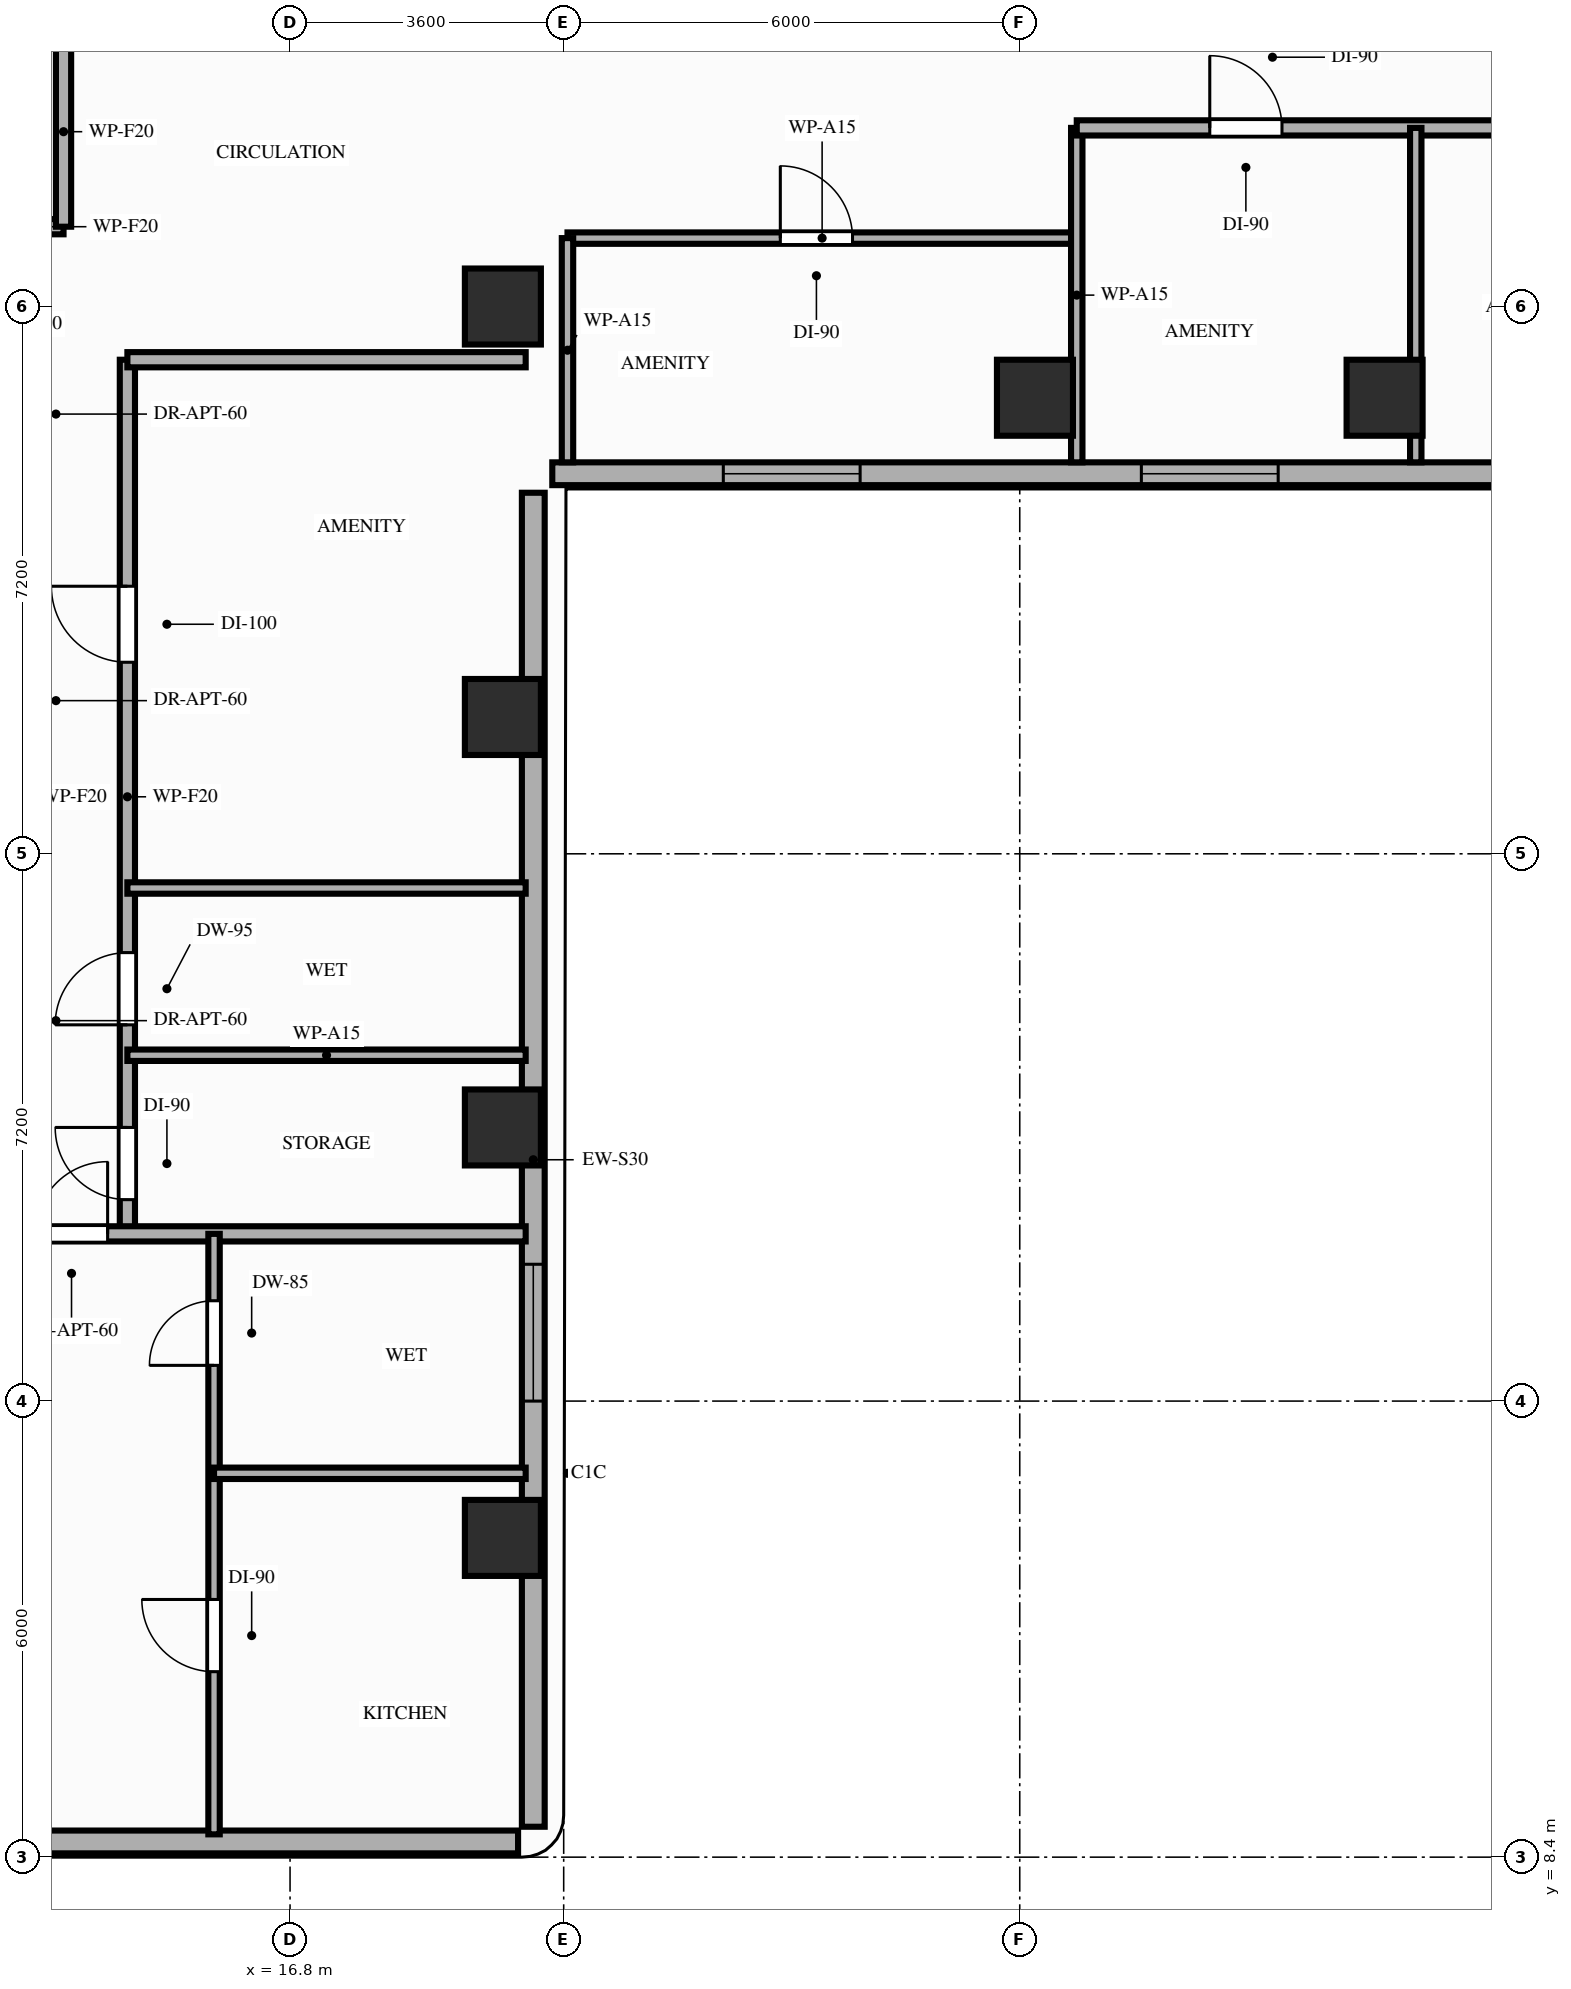
"""IFC4 building model, lengths in metres.
Left out: names, types, materials, properties, quantities, classifications, styles, units other than length and angle.
Written with IfcOpenShell. Run it as: python <this file> out.ifc"""

import sys

from ifc_helpers import new_model, si_unit, direction, frame, frame_2d, origin, origin_2d, place, context, subcontext, project, spatial, rectangle, extrude, element, fill, save


model = new_model("IFC4")
c1 = context("Model", 3, precision=1e-05, world=origin(), true_north=direction((0.0, 1.0)))
c2 = subcontext(c1, "Body", "Model", "MODEL_VIEW")
j1 = project(units=[si_unit("LENGTHUNIT", "METRE"), si_unit("PLANEANGLEUNIT", "RADIAN")], contexts=[c1])
p1 = place(None, origin())
s1 = spatial("IfcSite", under=j1, at=p1, CompositionType="ELEMENT")
p2 = place(p1, origin())
s2 = spatial("IfcBuilding", under=s1, at=p2, CompositionType="ELEMENT")
p3 = place(p2, frame((0.0, 0.0, 123.4)))
s3 = spatial("IfcBuildingStorey", under=s2, at=p3, CompositionType="ELEMENT", Elevation=123.4)
for number, where, z_axis, x_axis in (
    (1, (19.6, 12.6, 0.0), (0.0, 0.0, 1.0), (1.0, 0.0, 0.0)),
    (2, (19.6, 18.0, 0.0), (0.0, 0.0, 1.0), (1.0, 0.0, 0.0)),
    (3, (19.6, 23.4, 0.0), (0.0, 0.0, 1.0), (1.0, 0.0, 0.0)),
    (4, (19.6, 28.8, 0.0), (0.0, 0.0, 1.0), (1.0, 0.0, 0.0)),
    (5, (26.6, 27.6, 0.0), (0.0, 0.0, 1.0), (1.0, 0.0, 0.0)),
    (6, (31.2, 27.6, 0.0), (0.0, 0.0, 1.0), (1.0, 0.0, 0.0)),
):
    element("IfcColumn", number, at=place(p3, frame(where, z_axis=z_axis, x_axis=x_axis)), inside=s3, PredefinedType="COLUMN", context=c2, shape_type="SweptSolid", body=[
        extrude(rectangle(XDim=1.0, YDim=1.0, at=origin_2d()), origin(), (0.0, 0.0, 1.0), 3.2),
    ])
p4 = place(p3, frame((4.0, 8.6, 0.0), z_axis=(0.0, 0.0, 1.0), x_axis=(1.0, 0.0, 0.0)))
e7 = element("IfcWall", 7, at=p4, inside=s3, PredefinedType="STANDARD", context=c2, shape_type="SweptSolid", body=[
    extrude(rectangle(XDim=15.8, YDim=0.3, at=frame_2d((7.9, 0.0))), origin(), (0.0, 0.0, 1.0), 3.02),
])
p5 = place(p4, frame((6.85, 0.0, 0.85)))
e8 = element("IfcOpeningElement", 8, at=p5, cuts=e7, PredefinedType="OPENING", context=c2, shape_type="SweptSolid", body=[
    extrude(rectangle(XDim=1.8, YDim=1.75, at=frame_2d((0.9, 0.875))), frame((0.0, 0.16, 0.0), z_axis=(0.0, -1.0, 0.0), x_axis=(1.0, 0.0, 0.0)), (0.0, 0.0, 1.0), 0.32),
])
p6 = place(p3, frame((20.0, 8.8, 0.0), z_axis=(0.0, 0.0, 1.0), x_axis=(0.0, 1.0, 0.0)))
e9 = element("IfcWall", 9, at=p6, inside=s3, PredefinedType="STANDARD", context=c2, shape_type="SweptSolid", body=[
    extrude(rectangle(XDim=17.55, YDim=0.3, at=frame_2d((8.775, 0.0))), origin(), (0.0, 0.0, 1.0), 2.45),
])
p7 = place(p6, frame((5.6, 0.0, 0.85)))
e10 = element("IfcOpeningElement", 10, at=p7, cuts=e9, PredefinedType="OPENING", context=c2, shape_type="SweptSolid", body=[
    extrude(rectangle(XDim=1.8, YDim=1.35, at=frame_2d((0.9, 0.675))), frame((0.0, 0.16, 0.0), z_axis=(0.0, -1.0, 0.0), x_axis=(1.0, 0.0, 0.0)), (0.0, 0.0, 1.0), 0.32),
])
p8 = place(p3, frame((20.25, 26.6, 0.0), z_axis=(0.0, 0.0, 1.0), x_axis=(1.0, 0.0, 0.0)))
e11 = element("IfcWall", 11, at=p8, inside=s3, PredefinedType="STANDARD", context=c2, shape_type="SweptSolid", body=[
    extrude(rectangle(XDim=26.15, YDim=0.3, at=frame_2d((13.075, 0.0))), origin(), (0.0, 0.0, 1.0), 2.71),
])
p9 = place(p8, frame((13.9, 0.0, 0.0)))
e12 = element("IfcOpeningElement", 12, at=p9, cuts=e11, PredefinedType="OPENING", context=c2, shape_type="SweptSolid", body=[
    extrude(rectangle(XDim=1.3, YDim=2.08, at=frame_2d((0.65, 1.04))), frame((0.0, 0.16, 0.0), z_axis=(0.0, -1.0, 0.0), x_axis=(1.0, 0.0, 0.0)), (0.0, 0.0, 1.0), 0.32),
])
p10 = place(p8, frame((2.25, 0.0, 0.85)))
e13 = element("IfcOpeningElement", 13, at=p10, cuts=e11, PredefinedType="OPENING", context=c2, shape_type="SweptSolid", body=[
    extrude(rectangle(XDim=1.8, YDim=1.61, at=frame_2d((0.9, 0.805))), frame((0.0, 0.16, 0.0), z_axis=(0.0, -1.0, 0.0), x_axis=(1.0, 0.0, 0.0)), (0.0, 0.0, 1.0), 0.32),
])
p11 = place(p8, frame((7.75, 0.0, 0.85)))
e14 = element("IfcOpeningElement", 14, at=p11, cuts=e11, PredefinedType="OPENING", context=c2, shape_type="SweptSolid", body=[
    extrude(rectangle(XDim=1.8, YDim=1.61, at=frame_2d((0.9, 0.805))), frame((0.0, 0.16, 0.0), z_axis=(0.0, -1.0, 0.0), x_axis=(1.0, 0.0, 0.0)), (0.0, 0.0, 1.0), 0.32),
])
p12 = place(p8, frame((22.25, 0.0, 0.85)))
e15 = element("IfcOpeningElement", 15, at=p12, cuts=e11, PredefinedType="OPENING", context=c2, shape_type="SweptSolid", body=[
    extrude(rectangle(XDim=1.8, YDim=1.61, at=frame_2d((0.9, 0.805))), frame((0.0, 0.16, 0.0), z_axis=(0.0, -1.0, 0.0), x_axis=(1.0, 0.0, 0.0)), (0.0, 0.0, 1.0), 0.32),
])
p13 = place(p3, frame((12.55, 29.85, 0.0), z_axis=(0.0, 0.0, 1.0), x_axis=(1.0, 0.0, 0.0)))
e16 = element("IfcWall", 16, at=p13, inside=s3, PredefinedType="PARTITIONING", context=c2, shape_type="SweptSolid", body=[
    extrude(rectangle(XDim=1.27, YDim=0.2, at=frame_2d((0.635, 0.0))), origin(), (0.0, 0.0, 1.0), 3.02),
])
p14 = place(p13, frame((0.21, 0.0, 0.0)))
e17 = element("IfcOpeningElement", 17, at=p14, cuts=e16, PredefinedType="OPENING", context=c2, shape_type="SweptSolid", body=[
    extrude(rectangle(XDim=0.85, YDim=2.05, at=frame_2d((0.425, 1.025))), frame((0.0, 0.11, 0.0), z_axis=(0.0, -1.0, 0.0), x_axis=(1.0, 0.0, 0.0)), (0.0, 0.0, 1.0), 0.22),
])
p15 = place(p3, frame((13.82, 29.85, 0.0), z_axis=(0.0, 0.0, 1.0), x_axis=(0.0, 1.0, 0.0)))
e18 = element("IfcWall", 18, at=p15, inside=s3, PredefinedType="PARTITIONING", context=c2, shape_type="SweptSolid", body=[
    extrude(rectangle(XDim=2.5, YDim=0.2, at=frame_2d((1.25, 0.0))), origin(), (0.0, 0.0, 1.0), 3.02),
])
p16 = place(p3, frame((14.66, 16.6, 0.0), z_axis=(0.0, 0.0, 1.0), x_axis=(0.0, 1.0, 0.0)))
e19 = element("IfcWall", 19, at=p16, inside=s3, PredefinedType="PARTITIONING", context=c2, shape_type="SweptSolid", body=[
    extrude(rectangle(XDim=11.5, YDim=0.2, at=frame_2d((5.75, 0.0))), origin(), (0.0, 0.0, 1.0), 2.45),
])
p17 = place(p16, frame((0.45, 0.0, 0.0)))
e20 = element("IfcOpeningElement", 20, at=p17, cuts=e19, PredefinedType="OPENING", context=c2, shape_type="SweptSolid", body=[
    extrude(rectangle(XDim=0.95, YDim=2.15, at=frame_2d((0.475, 1.075))), frame((0.0, 0.11, 0.0), z_axis=(0.0, -1.0, 0.0), x_axis=(1.0, 0.0, 0.0)), (0.0, 0.0, 1.0), 0.22),
])
p18 = place(p16, frame((2.75, 0.0, 0.0)))
e21 = element("IfcOpeningElement", 21, at=p18, cuts=e19, PredefinedType="OPENING", context=c2, shape_type="SweptSolid", body=[
    extrude(rectangle(XDim=0.95, YDim=2.1, at=frame_2d((0.475, 1.05))), frame((0.0, 0.11, 0.0), z_axis=(0.0, -1.0, 0.0), x_axis=(1.0, 0.0, 0.0)), (0.0, 0.0, 1.0), 0.22),
])
p19 = place(p16, frame((7.52, 0.0, 0.0)))
e22 = element("IfcOpeningElement", 22, at=p19, cuts=e19, PredefinedType="OPENING", context=c2, shape_type="SweptSolid", body=[
    extrude(rectangle(XDim=1.0, YDim=2.15, at=frame_2d((0.5, 1.075))), frame((0.0, 0.11, 0.0), z_axis=(0.0, -1.0, 0.0), x_axis=(1.0, 0.0, 0.0)), (0.0, 0.0, 1.0), 0.22),
])
p20 = place(p3, frame((3.9, 16.6, 0.0), z_axis=(0.0, 0.0, 1.0), x_axis=(1.0, 0.0, 0.0)))
e23 = element("IfcWall", 23, at=p20, inside=s3, PredefinedType="PARTITIONING", context=c2, shape_type="SweptSolid", body=[
    extrude(rectangle(XDim=16.0, YDim=0.2, at=frame_2d((8.0, 0.0))), origin(), (0.0, 0.0, 1.0), 2.45),
])
p21 = place(p20, frame((9.55, 0.0, 0.0)))
e24 = element("IfcOpeningElement", 24, at=p21, cuts=e23, PredefinedType="OPENING", context=c2, shape_type="SweptSolid", body=[
    extrude(rectangle(XDim=0.95, YDim=2.15, at=frame_2d((0.475, 1.075))), frame((0.0, 0.11, 0.0), z_axis=(0.0, -1.0, 0.0), x_axis=(1.0, 0.0, 0.0)), (0.0, 0.0, 1.0), 0.22),
])
p22 = place(p3, frame((14.66, 28.1, 0.0), z_axis=(0.0, 0.0, 1.0), x_axis=(1.0, 0.0, 0.0)))
e25 = element("IfcWall", 25, at=p22, inside=s3, PredefinedType="PARTITIONING", context=c2, shape_type="SweptSolid", body=[
    extrude(rectangle(XDim=5.24, YDim=0.2, at=frame_2d((2.62, 0.0))), origin(), (0.0, 0.0, 1.0), 2.45),
])
p23 = place(p3, frame((20.45, 29.7, 0.0), z_axis=(0.0, 0.0, 1.0), x_axis=(1.0, 0.0, 0.0)))
e26 = element("IfcWall", 26, at=p23, inside=s3, PredefinedType="PARTITIONING", context=c2, shape_type="SweptSolid", body=[
    extrude(rectangle(XDim=6.7, YDim=0.15, at=frame_2d((3.35, 0.0))), origin(), (0.0, 0.0, 1.0), 3.02),
])
p24 = place(p23, frame((2.8, 0.0, 0.0)))
e27 = element("IfcOpeningElement", 27, at=p24, cuts=e26, PredefinedType="OPENING", context=c2, shape_type="SweptSolid", body=[
    extrude(rectangle(XDim=0.95, YDim=2.15, at=frame_2d((0.475, 1.075))), frame((0.0, 0.085, 0.0), z_axis=(0.0, -1.0, 0.0), x_axis=(1.0, 0.0, 0.0)), (0.0, 0.0, 1.0), 0.17),
])
p25 = place(p3, frame((20.45, 26.75, 0.0), z_axis=(0.0, 0.0, 1.0), x_axis=(0.0, 1.0, 0.0)))
e28 = element("IfcWall", 28, at=p25, inside=s3, PredefinedType="PARTITIONING", context=c2, shape_type="SweptSolid", body=[
    extrude(rectangle(XDim=2.95, YDim=0.15, at=frame_2d((1.475, 0.0))), origin(), (0.0, 0.0, 1.0), 2.45),
])
p26 = place(p3, frame((27.15, 26.75, 0.0), z_axis=(0.0, 0.0, 1.0), x_axis=(0.0, 1.0, 0.0)))
e29 = element("IfcWall", 29, at=p26, inside=s3, PredefinedType="PARTITIONING", context=c2, shape_type="SweptSolid", body=[
    extrude(rectangle(XDim=4.4, YDim=0.15, at=frame_2d((2.2, 0.0))), origin(), (0.0, 0.0, 1.0), 2.45),
])
p27 = place(p3, frame((15.8, 8.7, 0.0), z_axis=(0.0, 0.0, 1.0), x_axis=(0.0, 1.0, 0.0)))
e30 = element("IfcWall", 30, at=p27, inside=s3, PredefinedType="PARTITIONING", context=c2, shape_type="SweptSolid", body=[
    extrude(rectangle(XDim=7.9, YDim=0.15, at=frame_2d((3.95, 0.0))), origin(), (0.0, 0.0, 1.0), 2.45),
])
p28 = place(p27, frame((2.14, 0.0, 0.0)))
e31 = element("IfcOpeningElement", 31, at=p28, cuts=e30, PredefinedType="OPENING", context=c2, shape_type="SweptSolid", body=[
    extrude(rectangle(XDim=0.95, YDim=2.15, at=frame_2d((0.475, 1.075))), frame((0.0, 0.085, 0.0), z_axis=(0.0, -1.0, 0.0), x_axis=(1.0, 0.0, 0.0)), (0.0, 0.0, 1.0), 0.17),
])
p29 = place(p27, frame((6.17, 0.0, 0.0)))
e32 = element("IfcOpeningElement", 32, at=p29, cuts=e30, PredefinedType="OPENING", context=c2, shape_type="SweptSolid", body=[
    extrude(rectangle(XDim=0.85, YDim=2.1, at=frame_2d((0.425, 1.05))), frame((0.0, 0.085, 0.0), z_axis=(0.0, -1.0, 0.0), x_axis=(1.0, 0.0, 0.0)), (0.0, 0.0, 1.0), 0.17),
])
p30 = place(p3, frame((15.8, 13.45, 0.0), z_axis=(0.0, 0.0, 1.0), x_axis=(1.0, 0.0, 0.0)))
e33 = element("IfcWall", 33, at=p30, inside=s3, PredefinedType="PARTITIONING", context=c2, shape_type="SweptSolid", body=[
    extrude(rectangle(XDim=4.1, YDim=0.15, at=frame_2d((2.05, 0.0))), origin(), (0.0, 0.0, 1.0), 2.45),
])
for number, where, z_axis, x_axis in (
    (34, (14.66, 18.95, 0.0), (0.0, 0.0, 1.0), (1.0, 0.0, 0.0)),
    (35, (14.66, 21.15, 0.0), (0.0, 0.0, 1.0), (1.0, 0.0, 0.0)),
):
    element("IfcWall", number, at=place(p3, frame(where, z_axis=z_axis, x_axis=x_axis)), inside=s3, PredefinedType="PARTITIONING", context=c2, shape_type="SweptSolid", body=[
        extrude(rectangle(XDim=5.24, YDim=0.15, at=frame_2d((2.62, 0.0))), origin(), (0.0, 0.0, 1.0), 2.45),
    ])
p31 = place(p3, frame((27.15, 31.15, 0.0), z_axis=(0.0, 0.0, 1.0), x_axis=(1.0, 0.0, 0.0)))
e36 = element("IfcWall", 36, at=p31, inside=s3, PredefinedType="PARTITIONING", context=c2, shape_type="SweptSolid", body=[
    extrude(rectangle(XDim=13.95, YDim=0.2, at=frame_2d((6.975, 0.0))), origin(), (0.0, 0.0, 1.0), 2.45),
])
p32 = place(p31, frame((1.75, 0.0, 0.0)))
e37 = element("IfcOpeningElement", 37, at=p32, cuts=e36, PredefinedType="OPENING", context=c2, shape_type="SweptSolid", body=[
    extrude(rectangle(XDim=0.95, YDim=2.15, at=frame_2d((0.475, 1.075))), frame((0.0, 0.11, 0.0), z_axis=(0.0, -1.0, 0.0), x_axis=(1.0, 0.0, 0.0)), (0.0, 0.0, 1.0), 0.22),
])
p33 = place(p31, frame((6.84, 0.0, 0.0)))
e38 = element("IfcOpeningElement", 38, at=p33, cuts=e36, PredefinedType="OPENING", context=c2, shape_type="SweptSolid", body=[
    extrude(rectangle(XDim=0.95, YDim=2.15, at=frame_2d((0.475, 1.075))), frame((0.0, 0.11, 0.0), z_axis=(0.0, -1.0, 0.0), x_axis=(1.0, 0.0, 0.0)), (0.0, 0.0, 1.0), 0.22),
])
p34 = place(p31, frame((11.59, 0.0, 0.0)))
e39 = element("IfcOpeningElement", 39, at=p34, cuts=e36, PredefinedType="OPENING", context=c2, shape_type="SweptSolid", body=[
    extrude(rectangle(XDim=0.95, YDim=2.15, at=frame_2d((0.475, 1.075))), frame((0.0, 0.11, 0.0), z_axis=(0.0, -1.0, 0.0), x_axis=(1.0, 0.0, 0.0)), (0.0, 0.0, 1.0), 0.22),
])
p35 = place(p3, frame((31.61, 26.75, 0.0), z_axis=(0.0, 0.0, 1.0), x_axis=(0.0, 1.0, 0.0)))
e40 = element("IfcWall", 40, at=p35, inside=s3, PredefinedType="PARTITIONING", context=c2, shape_type="SweptSolid", body=[
    extrude(rectangle(XDim=4.4, YDim=0.15, at=frame_2d((2.2, 0.0))), origin(), (0.0, 0.0, 1.0), 2.45),
])
p36 = place(p7, origin())
e41 = element("IfcWindow", 41, at=p36, inside=s3, PartitioningType="SINGLE_PANEL", PredefinedType="WINDOW", context=c2, shape_type="SweptSolid", body=[
    extrude(rectangle(XDim=1.8, YDim=1.35, at=frame_2d((0.9, 0.675))), frame((0.0, 0.03, 0.0), z_axis=(0.0, -1.0, 0.0), x_axis=(1.0, 0.0, 0.0)), (0.0, 0.0, 1.0), 0.06),
])
fill(e10, e41)
p37 = place(p10, origin())
e42 = element("IfcWindow", 42, at=p37, inside=s3, PartitioningType="SINGLE_PANEL", PredefinedType="WINDOW", context=c2, shape_type="SweptSolid", body=[
    extrude(rectangle(XDim=1.8, YDim=1.61, at=frame_2d((0.9, 0.805))), frame((0.0, 0.03, 0.0), z_axis=(0.0, -1.0, 0.0), x_axis=(1.0, 0.0, 0.0)), (0.0, 0.0, 1.0), 0.06),
])
fill(e13, e42)
p38 = place(p11, origin())
e43 = element("IfcWindow", 43, at=p38, inside=s3, PartitioningType="SINGLE_PANEL", PredefinedType="WINDOW", context=c2, shape_type="SweptSolid", body=[
    extrude(rectangle(XDim=1.8, YDim=1.61, at=frame_2d((0.9, 0.805))), frame((0.0, 0.03, 0.0), z_axis=(0.0, -1.0, 0.0), x_axis=(1.0, 0.0, 0.0)), (0.0, 0.0, 1.0), 0.06),
])
fill(e14, e43)
p39 = place(p24, origin())
e44 = element("IfcDoor", 44, at=p39, inside=s3, OperationType="SINGLE_SWING_LEFT", PredefinedType="DOOR", context=c2, shape_type="SweptSolid", body=[
    extrude(rectangle(XDim=0.95, YDim=2.15, at=frame_2d((0.475, 1.075))), frame((0.0, 0.025, 0.0), z_axis=(0.0, -1.0, 0.0), x_axis=(1.0, 0.0, 0.0)), (0.0, 0.0, 1.0), 0.05),
])
fill(e27, e44)
p40 = place(p21, origin())
e45 = element("IfcDoor", 45, at=p40, inside=s3, OperationType="SINGLE_SWING_RIGHT", PredefinedType="DOOR", context=c2, shape_type="SweptSolid", body=[
    extrude(rectangle(XDim=0.95, YDim=2.15, at=frame_2d((0.475, 1.075))), frame((0.0, 0.025, 0.0), z_axis=(0.0, -1.0, 0.0), x_axis=(1.0, 0.0, 0.0)), (0.0, 0.0, 1.0), 0.05),
])
fill(e24, e45)
p41 = place(p28, origin())
e46 = element("IfcDoor", 46, at=p41, inside=s3, OperationType="SINGLE_SWING_RIGHT", PredefinedType="DOOR", context=c2, shape_type="SweptSolid", body=[
    extrude(rectangle(XDim=0.95, YDim=2.15, at=frame_2d((0.475, 1.075))), frame((0.0, 0.025, 0.0), z_axis=(0.0, -1.0, 0.0), x_axis=(1.0, 0.0, 0.0)), (0.0, 0.0, 1.0), 0.05),
])
fill(e31, e46)
p42 = place(p29, origin())
e47 = element("IfcDoor", 47, at=p42, inside=s3, OperationType="SINGLE_SWING_LEFT", PredefinedType="DOOR", context=c2, shape_type="SweptSolid", body=[
    extrude(rectangle(XDim=0.85, YDim=2.1, at=frame_2d((0.425, 1.05))), frame((0.0, 0.025, 0.0), z_axis=(0.0, -1.0, 0.0), x_axis=(1.0, 0.0, 0.0)), (0.0, 0.0, 1.0), 0.05),
])
fill(e32, e47)
p43 = place(p17, origin())
e48 = element("IfcDoor", 48, at=p43, inside=s3, OperationType="SINGLE_SWING_RIGHT", PredefinedType="DOOR", context=c2, shape_type="SweptSolid", body=[
    extrude(rectangle(XDim=0.95, YDim=2.15, at=frame_2d((0.475, 1.075))), frame((0.0, 0.025, 0.0), z_axis=(0.0, -1.0, 0.0), x_axis=(1.0, 0.0, 0.0)), (0.0, 0.0, 1.0), 0.05),
])
fill(e20, e48)
p44 = place(p18, origin())
e49 = element("IfcDoor", 49, at=p44, inside=s3, OperationType="SINGLE_SWING_LEFT", PredefinedType="DOOR", context=c2, shape_type="SweptSolid", body=[
    extrude(rectangle(XDim=0.95, YDim=2.1, at=frame_2d((0.475, 1.05))), frame((0.0, 0.025, 0.0), z_axis=(0.0, -1.0, 0.0), x_axis=(1.0, 0.0, 0.0)), (0.0, 0.0, 1.0), 0.05),
])
fill(e21, e49)
p45 = place(p19, origin())
e50 = element("IfcDoor", 50, at=p45, inside=s3, OperationType="SINGLE_SWING_RIGHT", PredefinedType="DOOR", context=c2, shape_type="SweptSolid", body=[
    extrude(rectangle(XDim=1.0, YDim=2.15, at=frame_2d((0.5, 1.075))), frame((0.0, 0.025, 0.0), z_axis=(0.0, -1.0, 0.0), x_axis=(1.0, 0.0, 0.0)), (0.0, 0.0, 1.0), 0.05),
])
fill(e22, e50)
p46 = place(p32, origin())
e51 = element("IfcDoor", 51, at=p46, inside=s3, OperationType="SINGLE_SWING_LEFT", PredefinedType="DOOR", context=c2, shape_type="SweptSolid", body=[
    extrude(rectangle(XDim=0.95, YDim=2.15, at=frame_2d((0.475, 1.075))), frame((0.0, 0.025, 0.0), z_axis=(0.0, -1.0, 0.0), x_axis=(1.0, 0.0, 0.0)), (0.0, 0.0, 1.0), 0.05),
])
fill(e37, e51)
save(model, sys.argv[1])
